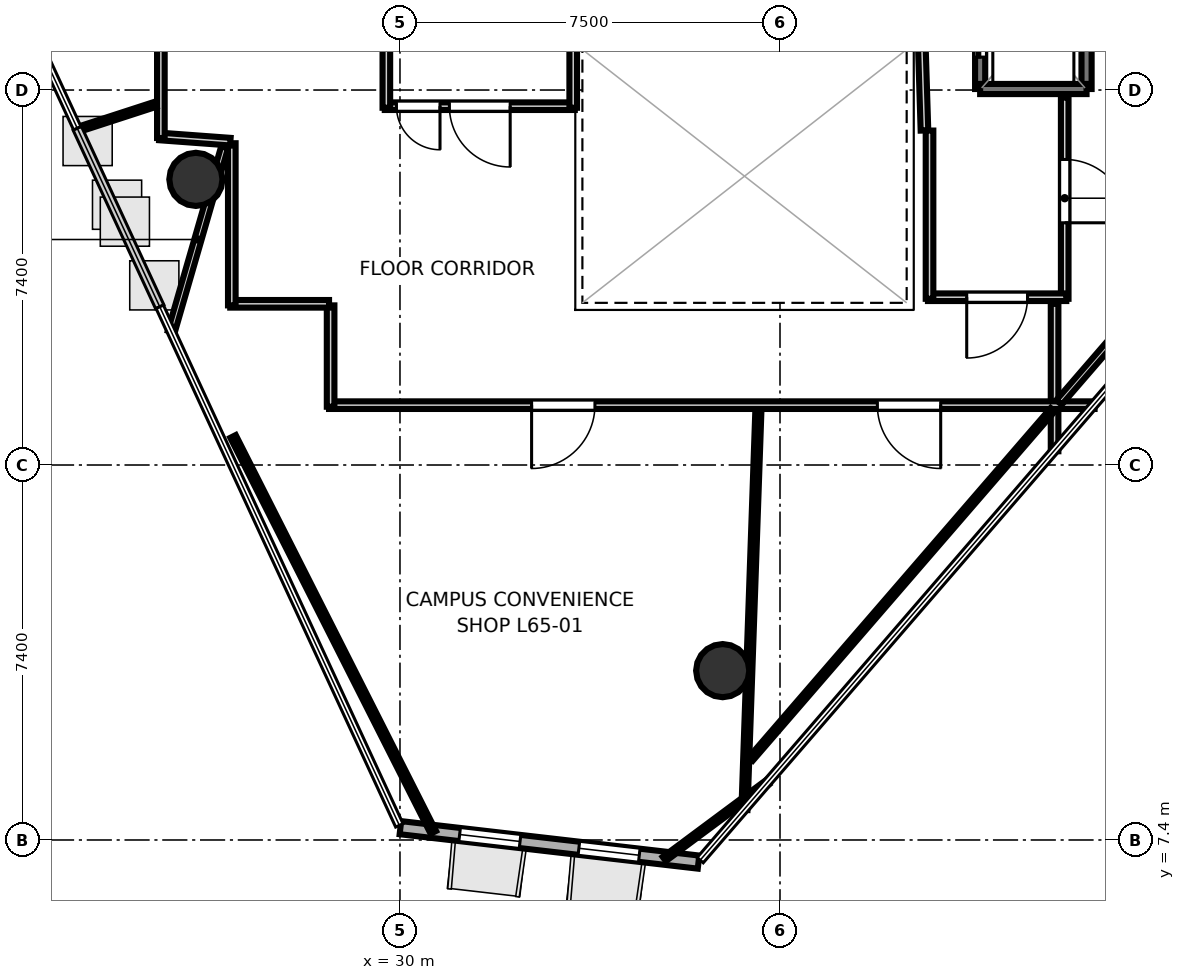
"""IFC4 building model, lengths in metres.
Left out: names, types, materials, properties, quantities, classifications, styles, units other than length and angle.
Written with IfcOpenShell. Run it as: python <this file> out.ifc"""

import sys

from ifc_helpers import new_model, si_unit, direction, frame, frame_2d, origin, origin_2d, place, context, subcontext, project, spatial, rectangle, hollow_circle, extrude, element, fill, save


model = new_model("IFC4")
c1 = context("Model", 3, precision=1e-05, world=origin(), true_north=direction((0.0, 1.0)))
c2 = subcontext(c1, "Body", "Model", "MODEL_VIEW")
j1 = project(units=[si_unit("LENGTHUNIT", "METRE"), si_unit("PLANEANGLEUNIT", "RADIAN")], contexts=[c1])
p1 = place(None, origin())
s1 = spatial("IfcSite", under=j1, at=p1, CompositionType="ELEMENT")
p2 = place(p1, origin())
s2 = spatial("IfcBuilding", under=s1, at=p2, CompositionType="ELEMENT")
p3 = place(p2, frame((0.0, 0.0, 253.8)))
s3 = spatial("IfcBuildingStorey", under=s2, at=p3, CompositionType="ELEMENT", Elevation=253.8)
for number, where, z_axis, x_axis in (
    (1, (25.972, 20.437, 0.0), (0.0, 0.0, 1.0), (1.0, 0.0, 0.0)),
    (2, (36.369, 10.742, 0.0), (0.0, 0.0, 1.0), (1.0, 0.0, 0.0)),
):
    element("IfcColumn", number, at=place(p3, frame(where, z_axis=z_axis, x_axis=x_axis)), inside=s3, PredefinedType="COLUMN", context=c2, shape_type="SweptSolid", body=[
        extrude(hollow_circle(Radius=0.525, WallThickness=0.028, at=origin_2d()), origin(), (0.0, 0.0, 1.0), 3.7),
    ])
p4 = place(p3, frame((30.009, 7.643, 0.0), z_axis=(0.0, 0.0, 1.0), x_axis=(0.993402073551, -0.114683565799, 0.0)))
e3 = element("IfcWall", 3, at=p4, inside=s3, PredefinedType="SOLIDWALL", context=c2, shape_type="SweptSolid", body=[
    extrude(rectangle(XDim=5.922, YDim=0.26, at=frame_2d((2.961, 0.0))), origin(), (0.0, 0.0, 1.0), 3.52),
])
p5 = place(p4, frame((1.177, 0.0, 0.9)))
e4 = element("IfcOpeningElement", 4, at=p5, cuts=e3, PredefinedType="OPENING", context=c2, shape_type="SweptSolid", body=[
    extrude(rectangle(XDim=1.2, YDim=2.0, at=frame_2d((0.6, 1.0))), frame((0.0, 0.14, 0.0), z_axis=(0.0, -1.0, 0.0), x_axis=(1.0, 0.0, 0.0)), (0.0, 0.0, 1.0), 0.28),
])
p6 = place(p4, frame((3.546, 0.0, 0.9)))
e5 = element("IfcOpeningElement", 5, at=p6, cuts=e3, PredefinedType="OPENING", context=c2, shape_type="SweptSolid", body=[
    extrude(rectangle(XDim=1.2, YDim=2.0, at=frame_2d((0.6, 1.0))), frame((0.0, 0.14, 0.0), z_axis=(0.0, -1.0, 0.0), x_axis=(1.0, 0.0, 0.0)), (0.0, 0.0, 1.0), 0.28),
])
p7 = place(p3, frame((43.55, 22.22, 0.0), z_axis=(0.0, 0.0, 1.0), x_axis=(0.0, 1.0, 0.0)))
e6 = element("IfcWall", 6, at=p7, inside=s3, PredefinedType="SOLIDWALL", context=c2, shape_type="SweptSolid", body=[
    extrude(rectangle(XDim=2.36, YDim=0.2, at=frame_2d((1.18, 0.0))), origin(), (0.0, 0.0, 1.0), 3.52),
])
p8 = place(p3, frame((41.45, 22.22, 0.0), z_axis=(0.0, 0.0, 1.0), x_axis=(0.0, 1.0, 0.0)))
e7 = element("IfcWall", 7, at=p8, inside=s3, PredefinedType="SOLIDWALL", context=c2, shape_type="SweptSolid", body=[
    extrude(rectangle(XDim=2.36, YDim=0.2, at=frame_2d((1.18, 0.0))), origin(), (0.0, 0.0, 1.0), 3.52),
])
p9 = place(p8, frame((0.63, 0.0, 0.0)))
e8 = element("IfcOpeningElement", 8, at=p9, cuts=e7, PredefinedType="OPENING", context=c2, shape_type="SweptSolid", body=[
    extrude(rectangle(XDim=1.1, YDim=2.15, at=frame_2d((0.55, 1.075))), frame((0.0, 0.11, 0.0), z_axis=(0.0, -1.0, 0.0), x_axis=(1.0, 0.0, 0.0)), (0.0, 0.0, 1.0), 0.22),
])
p10 = place(p3, frame((41.45, 22.22, 0.0), z_axis=(0.0, 0.0, 1.0), x_axis=(1.0, 0.0, 0.0)))
e9 = element("IfcWall", 9, at=p10, inside=s3, PredefinedType="SOLIDWALL", context=c2, shape_type="SweptSolid", body=[
    extrude(rectangle(XDim=2.1, YDim=0.2, at=frame_2d((1.05, 0.0))), origin(), (0.0, 0.0, 1.0), 3.52),
])
p11 = place(p3, frame((33.45, 21.881, 0.0), z_axis=(0.0, 0.0, 1.0), x_axis=(-1.0, 0.0, 0.0)))
e10 = element("IfcWall", 10, at=p11, inside=s3, PredefinedType="PARTITIONING", context=c2, shape_type="SweptSolid", body=[
    extrude(rectangle(XDim=3.75, YDim=0.15, at=frame_2d((1.875, 0.0))), origin(), (0.0, 0.0, 1.0), 2.84),
])
p12 = place(p11, frame((1.275, 0.0, 0.0)))
e11 = element("IfcOpeningElement", 11, at=p12, cuts=e10, PredefinedType="OPENING", context=c2, shape_type="SweptSolid", body=[
    extrude(rectangle(XDim=1.2, YDim=2.15, at=frame_2d((0.6, 1.075))), frame((0.0, 0.085, 0.0), z_axis=(0.0, -1.0, 0.0), x_axis=(1.0, 0.0, 0.0)), (0.0, 0.0, 1.0), 0.17),
])
p13 = place(p11, frame((2.66, 0.0, 0.0)))
e12 = element("IfcOpeningElement", 12, at=p13, cuts=e10, PredefinedType="OPENING", context=c2, shape_type="SweptSolid", body=[
    extrude(rectangle(XDim=0.86, YDim=2.05, at=frame_2d((0.43, 1.025))), frame((0.0, 0.085, 0.0), z_axis=(0.0, -1.0, 0.0), x_axis=(1.0, 0.0, 0.0)), (0.0, 0.0, 1.0), 0.17),
])
for number, where, z_axis, x_axis in (
    (13, (29.731, 21.85, 0.0), (0.0, 0.0, 1.0), (0.0, 1.0, 0.0)),
    (14, (33.419, 24.542, 0.0), (0.0, 0.0, 1.0), (0.0, -1.0, 0.0)),
):
    element("IfcWall", number, at=place(p3, frame(where, z_axis=z_axis, x_axis=x_axis)), inside=s3, PredefinedType="PARTITIONING", context=c2, shape_type="SweptSolid", body=[
        extrude(rectangle(XDim=2.692, YDim=0.15, at=frame_2d((1.346, 0.0))), origin(), (0.0, 0.0, 1.0), 2.84),
    ])
p14 = place(p3, frame((40.351, 21.401, 0.0), z_axis=(0.0, 0.0, 1.0), x_axis=(-0.031058045979, 0.999517582527, 0.0)))
e15 = element("IfcWall", 15, at=p14, inside=s3, PredefinedType="PARTITIONING", context=c2, shape_type="SweptSolid", body=[
    extrude(rectangle(XDim=1.682, YDim=0.15, at=frame_2d((0.841, 0.0))), origin(), (0.0, 0.0, 1.0), 2.84),
])
p15 = place(p3, frame((43.119, 22.05, 0.0), z_axis=(0.0, 0.0, 1.0), x_axis=(0.0, -1.0, 0.0)))
e16 = element("IfcWall", 16, at=p15, inside=s3, PredefinedType="PARTITIONING", context=c2, shape_type="SweptSolid", body=[
    extrude(rectangle(XDim=3.97, YDim=0.15, at=frame_2d((1.985, 0.0))), origin(), (0.0, 0.0, 1.0), 2.84),
])
p16 = place(p15, frame((1.22, 0.0, 0.0)))
e17 = element("IfcOpeningElement", 17, at=p16, cuts=e16, PredefinedType="OPENING", context=c2, shape_type="SweptSolid", body=[
    extrude(rectangle(XDim=1.25, YDim=2.2, at=frame_2d((0.625, 1.1))), frame((0.0, 0.085, 0.0), z_axis=(0.0, -1.0, 0.0), x_axis=(1.0, 0.0, 0.0)), (0.0, 0.0, 1.0), 0.17),
])
p17 = place(p3, frame((43.15, 18.111, 0.0), z_axis=(0.0, 0.0, 1.0), x_axis=(-1.0, 0.0, 0.0)))
e18 = element("IfcWall", 18, at=p17, inside=s3, PredefinedType="PARTITIONING", context=c2, shape_type="SweptSolid", body=[
    extrude(rectangle(XDim=2.73, YDim=0.15, at=frame_2d((1.365, 0.0))), origin(), (0.0, 0.0, 1.0), 2.84),
])
p18 = place(p17, frame((0.765, 0.0, 0.0)))
e19 = element("IfcOpeningElement", 19, at=p18, cuts=e18, PredefinedType="OPENING", context=c2, shape_type="SweptSolid", body=[
    extrude(rectangle(XDim=1.2, YDim=2.15, at=frame_2d((0.6, 1.075))), frame((0.0, 0.085, 0.0), z_axis=(0.0, -1.0, 0.0), x_axis=(1.0, 0.0, 0.0)), (0.0, 0.0, 1.0), 0.17),
])
p19 = place(p3, frame((40.451, 18.08, 0.0), z_axis=(0.0, 0.0, 1.0), x_axis=(0.0, 1.0, 0.0)))
e20 = element("IfcWall", 20, at=p19, inside=s3, PredefinedType="PARTITIONING", context=c2, shape_type="SweptSolid", body=[
    extrude(rectangle(XDim=3.32, YDim=0.15, at=frame_2d((1.66, 0.0))), origin(), (0.0, 0.0, 1.0), 2.84),
])
p20 = place(p3, frame((42.919, 17.98, 0.0), z_axis=(0.0, 0.0, 1.0), x_axis=(0.0, -1.0, 0.0)))
e21 = element("IfcWall", 21, at=p20, inside=s3, PredefinedType="PARTITIONING", context=c2, shape_type="SweptSolid", body=[
    extrude(rectangle(XDim=2.909, YDim=0.15, at=frame_2d((1.454, 0.0))), origin(), (0.0, 0.0, 1.0), 2.84),
])
p21 = place(p3, frame((43.708, 15.981, 0.0), z_axis=(0.0, 0.0, 1.0), x_axis=(-1.0, 0.0, 0.0)))
e22 = element("IfcWall", 22, at=p21, inside=s3, PredefinedType="PARTITIONING", context=c2, shape_type="SweptSolid", body=[
    extrude(rectangle(XDim=15.108, YDim=0.15, at=frame_2d((7.554, 0.0))), origin(), (0.0, 0.0, 1.0), 2.84),
])
p22 = place(p21, frame((9.86, 0.0, 0.0)))
e23 = element("IfcOpeningElement", 23, at=p22, cuts=e22, PredefinedType="OPENING", context=c2, shape_type="SweptSolid", body=[
    extrude(rectangle(XDim=1.25, YDim=2.2, at=frame_2d((0.625, 1.1))), frame((0.0, 0.085, 0.0), z_axis=(0.0, -1.0, 0.0), x_axis=(1.0, 0.0, 0.0)), (0.0, 0.0, 1.0), 0.17),
])
p23 = place(p21, frame((3.037, 0.0, 0.0)))
e24 = element("IfcOpeningElement", 24, at=p23, cuts=e22, PredefinedType="OPENING", context=c2, shape_type="SweptSolid", body=[
    extrude(rectangle(XDim=1.25, YDim=2.2, at=frame_2d((0.625, 1.1))), frame((0.0, 0.085, 0.0), z_axis=(0.0, -1.0, 0.0), x_axis=(1.0, 0.0, 0.0)), (0.0, 0.0, 1.0), 0.17),
])
p24 = place(p3, frame((28.631, 15.95, 0.0), z_axis=(0.0, 0.0, 1.0), x_axis=(0.0, 1.0, 0.0)))
e25 = element("IfcWall", 25, at=p24, inside=s3, PredefinedType="PARTITIONING", context=c2, shape_type="SweptSolid", body=[
    extrude(rectangle(XDim=2.0, YDim=0.15, at=frame_2d((1.0, 0.0))), origin(), (0.0, 0.0, 1.0), 2.84),
])
p25 = place(p3, frame((28.6, 17.981, 0.0), z_axis=(0.0, 0.0, 1.0), x_axis=(-1.0, 0.0, 0.0)))
e26 = element("IfcWall", 26, at=p25, inside=s3, PredefinedType="PARTITIONING", context=c2, shape_type="SweptSolid", body=[
    extrude(rectangle(XDim=1.95, YDim=0.15, at=frame_2d((0.975, 0.0))), origin(), (0.0, 0.0, 1.0), 2.84),
])
p26 = place(p3, frame((26.681, 17.95, 0.0), z_axis=(0.0, 0.0, 1.0), x_axis=(0.0, 1.0, 0.0)))
e27 = element("IfcWall", 27, at=p26, inside=s3, PredefinedType="PARTITIONING", context=c2, shape_type="SweptSolid", body=[
    extrude(rectangle(XDim=3.2, YDim=0.15, at=frame_2d((1.6, 0.0))), origin(), (0.0, 0.0, 1.0), 2.84),
])
p27 = place(p3, frame((26.652, 21.181, 0.0), z_axis=(0.0, 0.0, 1.0), x_axis=(-0.997303696291, 0.073384857861, 0.0)))
e28 = element("IfcWall", 28, at=p27, inside=s3, PredefinedType="PARTITIONING", context=c2, shape_type="SweptSolid", body=[
    extrude(rectangle(XDim=1.404, YDim=0.15, at=frame_2d((0.702, 0.0))), origin(), (0.0, 0.0, 1.0), 2.84),
])
p28 = place(p3, frame((25.281, 21.253, 0.0), z_axis=(0.0, 0.0, 1.0), x_axis=(0.0, 1.0, 0.0)))
e29 = element("IfcWall", 29, at=p28, inside=s3, PredefinedType="PARTITIONING", context=c2, shape_type="SweptSolid", body=[
    extrude(rectangle(XDim=11.297, YDim=0.15, at=frame_2d((5.648, 0.0))), origin(), (0.0, 0.0, 1.0), 2.84),
])
p29 = place(p28, frame((5.04, 0.0, 0.0)))
e30 = element("IfcOpeningElement", 30, at=p29, cuts=e29, PredefinedType="OPENING", context=c2, shape_type="SweptSolid", body=[
    extrude(rectangle(XDim=1.25, YDim=2.2, at=frame_2d((0.625, 1.1))), frame((0.0, 0.085, 0.0), z_axis=(0.0, -1.0, 0.0), x_axis=(1.0, 0.0, 0.0)), (0.0, 0.0, 1.0), 0.17),
])
p30 = place(p3, frame((26.539, 21.07, 0.0), z_axis=(0.0, 0.0, 1.0), x_axis=(-0.277851542919, -0.9606240264, 0.0)))
e31 = element("IfcWall", 31, at=p30, inside=s3, PredefinedType="PARTITIONING", context=c2, shape_type="SweptSolid", body=[
    extrude(rectangle(XDim=3.789, YDim=0.14, at=frame_2d((1.895, 0.0))), origin(), (0.0, 0.0, 1.0), 2.84),
])
p31 = place(p3, frame((37.073, 15.871, 0.0), z_axis=(0.0, 0.0, 1.0), x_axis=(-0.034903879561, -0.999390673957, 0.0)))
e32 = element("IfcWall", 32, at=p31, inside=s3, PredefinedType="PARTITIONING", context=c2, shape_type="SweptSolid", body=[
    extrude(rectangle(XDim=7.883, YDim=0.12, at=frame_2d((3.941, 0.0))), origin(), (0.0, 0.0, 1.0), 2.84),
])
p32 = place(p3, frame((37.253, 8.539, 0.0), z_axis=(0.0, 0.0, 1.0), x_axis=(-0.802670163105, -0.59642317968, 0.0)))
e33 = element("IfcWall", 33, at=p32, inside=s3, PredefinedType="PARTITIONING", context=c2, shape_type="SweptSolid", body=[
    extrude(rectangle(XDim=2.538, YDim=0.105, at=frame_2d((1.269, 0.0))), origin(), (0.0, 0.0, 1.0), 2.84),
])
p33 = place(p3, frame((30.658, 7.551, 0.0), z_axis=(0.0, 0.0, 1.0), x_axis=(-0.451424525523, 0.892309306102, 0.0)))
e34 = element("IfcWall", 34, at=p33, inside=s3, PredefinedType="PARTITIONING", context=c2, shape_type="SweptSolid", body=[
    extrude(rectangle(XDim=8.756, YDim=0.12, at=frame_2d((4.378, 0.0))), origin(), (0.0, 0.0, 1.0), 2.84),
])
p34 = place(p3, frame((23.624, 21.414, 0.0), z_axis=(0.0, 0.0, 1.0), x_axis=(0.951014330615, 0.309146798405, 0.0)))
e35 = element("IfcWall", 35, at=p34, inside=s3, PredefinedType="PARTITIONING", context=c2, shape_type="SweptSolid", body=[
    extrude(rectangle(XDim=1.636, YDim=0.105, at=frame_2d((0.818, 0.0))), origin(), (0.0, 0.0, 1.0), 2.84),
])
p35 = place(p3, frame((42.881, 15.89, 0.0), z_axis=(0.0, 0.0, 1.0), x_axis=(-0.65403919505, -0.7564606608, 0.0)))
e36 = element("IfcWall", 36, at=p35, inside=s3, PredefinedType="PARTITIONING", context=c2, shape_type="SweptSolid", body=[
    extrude(rectangle(XDim=9.108, YDim=0.105, at=frame_2d((4.554, 0.0))), origin(), (0.0, 0.0, 1.0), 2.84),
])
p36 = place(p3, frame((46.952, 20.599, 0.0), z_axis=(0.0, 0.0, 1.0), x_axis=(-0.654038047912, -0.756461652619, 0.0)))
e37 = element("IfcWall", 37, at=p36, inside=s3, PredefinedType="PARTITIONING", context=c2, shape_type="SweptSolid", body=[
    extrude(rectangle(XDim=6.033, YDim=0.14, at=frame_2d((3.017, 0.0))), origin(), (0.0, 0.0, 1.0), 2.84),
])
p37 = place(p9, origin())
e38 = element("IfcDoor", 38, at=p37, inside=s3, OperationType="SLIDING_TO_LEFT", PredefinedType="DOOR", context=c2, shape_type="SweptSolid", body=[
    extrude(rectangle(XDim=1.1, YDim=2.15, at=frame_2d((0.55, 1.075))), frame((0.0, 0.025, 0.0), z_axis=(0.0, -1.0, 0.0), x_axis=(1.0, 0.0, 0.0)), (0.0, 0.0, 1.0), 0.05),
])
fill(e8, e38)
p38 = place(p12, origin())
e39 = element("IfcDoor", 39, at=p38, inside=s3, OperationType="SINGLE_SWING_LEFT", PredefinedType="DOOR", context=c2, shape_type="SweptSolid", body=[
    extrude(rectangle(XDim=1.2, YDim=2.15, at=frame_2d((0.6, 1.075))), frame((0.0, 0.025, 0.0), z_axis=(0.0, -1.0, 0.0), x_axis=(1.0, 0.0, 0.0)), (0.0, 0.0, 1.0), 0.05),
])
fill(e11, e39)
p39 = place(p18, origin())
e40 = element("IfcDoor", 40, at=p39, inside=s3, OperationType="SINGLE_SWING_RIGHT", PredefinedType="DOOR", context=c2, shape_type="SweptSolid", body=[
    extrude(rectangle(XDim=1.2, YDim=2.15, at=frame_2d((0.6, 1.075))), frame((0.0, 0.025, 0.0), z_axis=(0.0, -1.0, 0.0), x_axis=(1.0, 0.0, 0.0)), (0.0, 0.0, 1.0), 0.05),
])
fill(e19, e40)
p40 = place(p13, origin())
e41 = element("IfcDoor", 41, at=p40, inside=s3, OperationType="SINGLE_SWING_LEFT", PredefinedType="DOOR", context=c2, shape_type="SweptSolid", body=[
    extrude(rectangle(XDim=0.86, YDim=2.05, at=frame_2d((0.43, 1.025))), frame((0.0, 0.025, 0.0), z_axis=(0.0, -1.0, 0.0), x_axis=(1.0, 0.0, 0.0)), (0.0, 0.0, 1.0), 0.05),
])
fill(e12, e41)
p41 = place(p22, origin())
e42 = element("IfcDoor", 42, at=p41, inside=s3, OperationType="SINGLE_SWING_RIGHT", PredefinedType="DOOR", context=c2, shape_type="SweptSolid", body=[
    extrude(rectangle(XDim=1.25, YDim=2.2, at=frame_2d((0.625, 1.1))), frame((0.0, 0.025, 0.0), z_axis=(0.0, -1.0, 0.0), x_axis=(1.0, 0.0, 0.0)), (0.0, 0.0, 1.0), 0.05),
])
fill(e23, e42)
p42 = place(p23, origin())
e43 = element("IfcDoor", 43, at=p42, inside=s3, OperationType="SINGLE_SWING_LEFT", PredefinedType="DOOR", context=c2, shape_type="SweptSolid", body=[
    extrude(rectangle(XDim=1.25, YDim=2.2, at=frame_2d((0.625, 1.1))), frame((0.0, 0.025, 0.0), z_axis=(0.0, -1.0, 0.0), x_axis=(1.0, 0.0, 0.0)), (0.0, 0.0, 1.0), 0.05),
])
fill(e24, e43)
p43 = place(p16, origin())
e44 = element("IfcDoor", 44, at=p43, inside=s3, OperationType="SINGLE_SWING_RIGHT", PredefinedType="DOOR", context=c2, shape_type="SweptSolid", body=[
    extrude(rectangle(XDim=1.25, YDim=2.2, at=frame_2d((0.625, 1.1))), frame((0.0, 0.025, 0.0), z_axis=(0.0, -1.0, 0.0), x_axis=(1.0, 0.0, 0.0)), (0.0, 0.0, 1.0), 0.05),
])
fill(e17, e44)
p44 = place(p5, origin())
e45 = element("IfcWindow", 45, at=p44, inside=s3, PartitioningType="SINGLE_PANEL", PredefinedType="WINDOW", context=c2, shape_type="SweptSolid", body=[
    extrude(rectangle(XDim=1.2, YDim=2.0, at=frame_2d((0.6, 1.0))), frame((0.0, 0.03, 0.0), z_axis=(0.0, -1.0, 0.0), x_axis=(1.0, 0.0, 0.0)), (0.0, 0.0, 1.0), 0.06),
])
fill(e4, e45)
p45 = place(p6, origin())
e46 = element("IfcWindow", 46, at=p45, inside=s3, PartitioningType="SINGLE_PANEL", PredefinedType="WINDOW", context=c2, shape_type="SweptSolid", body=[
    extrude(rectangle(XDim=1.2, YDim=2.0, at=frame_2d((0.6, 1.0))), frame((0.0, 0.03, 0.0), z_axis=(0.0, -1.0, 0.0), x_axis=(1.0, 0.0, 0.0)), (0.0, 0.0, 1.0), 0.06),
])
fill(e5, e46)
save(model, sys.argv[1])
